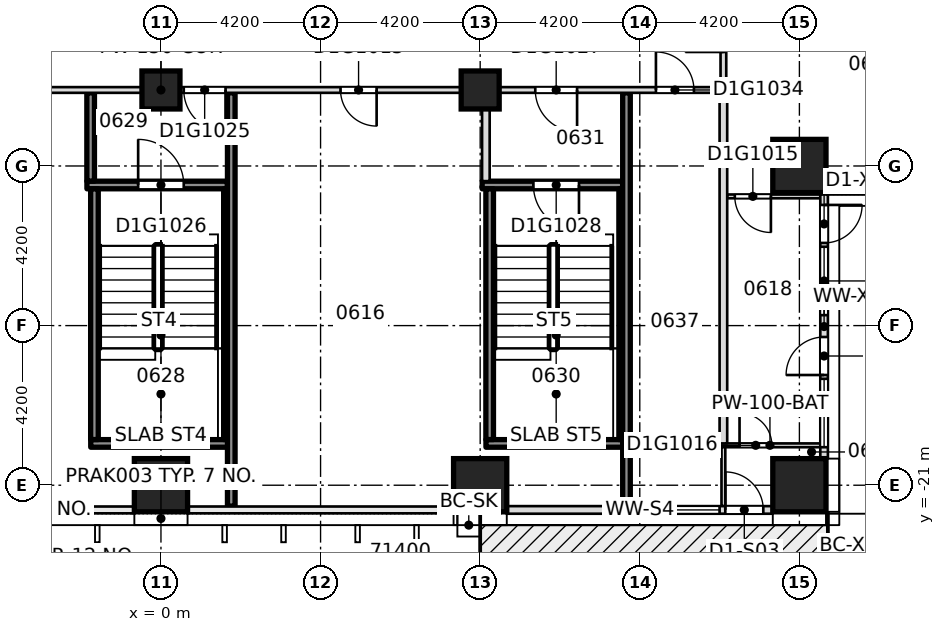
"""IFC4 building model, lengths in metres.
Left out: names, types, materials, properties, quantities, classifications, styles, units other than length and angle.
Written with IfcOpenShell. Run it as: python <this file> out.ifc"""

import sys

from ifc_helpers import new_model, si_unit, direction, frame, frame_2d, origin, origin_2d, place, context, subcontext, project, spatial, rectangle, extrude, element, fill, save


model = new_model("IFC4")
c1 = context("Model", 3, precision=1e-05, world=origin(), true_north=direction((0.0, 1.0)))
c2 = subcontext(c1, "Body", "Model", "MODEL_VIEW")
j1 = project(units=[si_unit("LENGTHUNIT", "METRE"), si_unit("PLANEANGLEUNIT", "RADIAN")], contexts=[c1])
p1 = place(None, origin())
s1 = spatial("IfcSite", under=j1, at=p1, CompositionType="ELEMENT")
p2 = place(p1, origin())
s2 = spatial("IfcBuilding", under=s1, at=p2, CompositionType="ELEMENT")
p3 = place(p2, frame((0.0, 0.0, 34.5)))
s3 = spatial("IfcBuildingStorey", under=s2, at=p3, CompositionType="ELEMENT", Elevation=34.5)
for number, where, z_axis, x_axis in (
    (1, (0.0, -21.0, -0.32), (0.0, 0.0, 1.0), (1.0, 0.0, 0.0)),
    (2, (8.4, -21.0, -0.32), (0.0, 0.0, 1.0), (1.0, 0.0, 0.0)),
    (3, (16.8, -21.0, -0.32), (0.0, 0.0, 1.0), (1.0, 0.0, 0.0)),
    (4, (16.8, -12.6, -0.32), (0.0, 0.0, 1.0), (1.0, 0.0, 0.0)),
):
    element("IfcColumn", number, at=place(p3, frame(where, z_axis=z_axis, x_axis=x_axis)), inside=s3, PredefinedType="COLUMN", context=c2, shape_type="SweptSolid", body=[
        extrude(rectangle(XDim=1.4, YDim=1.4, at=origin_2d()), origin(), (0.0, 0.0, 1.0), 3.45),
    ])
for number, where, z_axis, x_axis in (
    (5, (0.0, -10.6, -0.32), (0.0, 0.0, 1.0), (1.0, 0.0, 0.0)),
    (6, (8.4, -10.6, -0.32), (0.0, 0.0, 1.0), (1.0, 0.0, 0.0)),
):
    element("IfcColumn", number, at=place(p3, frame(where, z_axis=z_axis, x_axis=x_axis)), inside=s3, PredefinedType="COLUMN", context=c2, shape_type="SweptSolid", body=[
        extrude(rectangle(XDim=1.0, YDim=1.0, at=origin_2d()), origin(), (0.0, 0.0, 1.0), 3.45),
    ])
p4 = place(p3, frame((14.7, -19.95, 0.0), z_axis=(0.0, 0.0, 1.0), x_axis=(1.0, 0.0, 0.0)))
e7 = element("IfcWall", 7, at=p4, inside=s3, PredefinedType="PARTITIONING", context=c2, shape_type="SweptSolid", body=[
    extrude(rectangle(XDim=2.65, YDim=0.1, at=frame_2d((1.325, 0.0))), origin(), (0.0, 0.0, 1.0), 3.13),
])
p5 = place(p4, frame((0.525, 0.0, 0.0)))
e8 = element("IfcOpeningElement", 8, at=p5, cuts=e7, PredefinedType="OPENING", context=c2, shape_type="SweptSolid", body=[
    extrude(rectangle(XDim=0.85, YDim=2.1, at=frame_2d((0.425, 1.05))), frame((0.0, 0.06, 0.0), z_axis=(0.0, -1.0, 0.0), x_axis=(1.0, 0.0, 0.0)), (0.0, 0.0, 1.0), 0.12),
])
p6 = place(p3, frame((-1.848, -19.9, 0.0), z_axis=(0.0, 0.0, 1.0), x_axis=(1.0, 0.0, 0.0)))
e9 = element("IfcWall", 9, at=p6, inside=s3, PredefinedType="SOLIDWALL", context=c2, shape_type="SweptSolid", body=[
    extrude(rectangle(XDim=3.696, YDim=0.2, at=frame_2d((1.848, 0.0))), origin(), (0.0, 0.0, 1.0), 3.13),
])
p7 = place(p3, frame((8.552, -19.9, 0.0), z_axis=(0.0, 0.0, 1.0), x_axis=(1.0, 0.0, 0.0)))
e10 = element("IfcWall", 10, at=p7, inside=s3, PredefinedType="SOLIDWALL", context=c2, shape_type="SweptSolid", body=[
    extrude(rectangle(XDim=3.696, YDim=0.2, at=frame_2d((1.848, 0.0))), origin(), (0.0, 0.0, 1.0), 3.13),
])
p8 = place(p3, frame((14.9, -13.4, 0.0), z_axis=(0.0, 0.0, 1.0), x_axis=(1.0, 0.0, 0.0)))
e11 = element("IfcWall", 11, at=p8, inside=s3, PredefinedType="PARTITIONING", context=c2, shape_type="SweptSolid", body=[
    extrude(rectangle(XDim=2.45, YDim=0.1, at=frame_2d((1.225, 0.0))), origin(), (0.0, 0.0, 1.0), 3.13),
])
p9 = place(p8, frame((0.2, 0.0, 0.0)))
e12 = element("IfcOpeningElement", 12, at=p9, cuts=e11, PredefinedType="OPENING", context=c2, shape_type="SweptSolid", body=[
    extrude(rectangle(XDim=0.95, YDim=2.1, at=frame_2d((0.475, 1.05))), frame((0.0, 0.06, 0.0), z_axis=(0.0, -1.0, 0.0), x_axis=(1.0, 0.0, 0.0)), (0.0, 0.0, 1.0), 0.12),
])
p10 = place(p3, frame((-1.948, -13.1, 0.0), z_axis=(0.0, 0.0, 1.0), x_axis=(1.0, 0.0, 0.0)))
e13 = element("IfcWall", 13, at=p10, inside=s3, PredefinedType="SOLIDWALL", context=c2, shape_type="SweptSolid", body=[
    extrude(rectangle(XDim=3.696, YDim=0.2, at=frame_2d((1.848, 0.0))), origin(), (0.0, 0.0, 1.0), 3.13),
])
p11 = place(p10, frame((1.348, 0.0, 0.0)))
e14 = element("IfcOpeningElement", 14, at=p11, cuts=e13, PredefinedType="OPENING", context=c2, shape_type="SweptSolid", body=[
    extrude(rectangle(XDim=1.2, YDim=2.1, at=frame_2d((0.6, 1.05))), frame((0.0, 0.11, 0.0), z_axis=(0.0, -1.0, 0.0), x_axis=(1.0, 0.0, 0.0)), (0.0, 0.0, 1.0), 0.22),
])
p12 = place(p3, frame((8.452, -13.1, 0.0), z_axis=(0.0, 0.0, 1.0), x_axis=(1.0, 0.0, 0.0)))
e15 = element("IfcWall", 15, at=p12, inside=s3, PredefinedType="SOLIDWALL", context=c2, shape_type="SweptSolid", body=[
    extrude(rectangle(XDim=3.696, YDim=0.2, at=frame_2d((1.848, 0.0))), origin(), (0.0, 0.0, 1.0), 3.13),
])
p13 = place(p12, frame((1.348, 0.0, 0.0)))
e16 = element("IfcOpeningElement", 16, at=p13, cuts=e15, PredefinedType="OPENING", context=c2, shape_type="SweptSolid", body=[
    extrude(rectangle(XDim=1.2, YDim=2.1, at=frame_2d((0.6, 1.05))), frame((0.0, 0.11, 0.0), z_axis=(0.0, -1.0, 0.0), x_axis=(1.0, 0.0, 0.0)), (0.0, 0.0, 1.0), 0.22),
])
p14 = place(p3, frame((-14.9, -10.6, 0.0), z_axis=(0.0, 0.0, 1.0), x_axis=(1.0, 0.0, 0.0)))
e17 = element("IfcWall", 17, at=p14, inside=s3, PredefinedType="PARTITIONING", context=c2, shape_type="SweptSolid", body=[
    extrude(rectangle(XDim=29.8, YDim=0.15, at=frame_2d((14.9, 0.0))), origin(), (0.0, 0.0, 1.0), 3.13),
])
p15 = place(p14, frame((9.225, 0.0, 0.0)))
e18 = element("IfcOpeningElement", 18, at=p15, cuts=e17, PredefinedType="OPENING", context=c2, shape_type="SweptSolid", body=[
    extrude(rectangle(XDim=0.95, YDim=2.1, at=frame_2d((0.475, 1.05))), frame((0.0, 0.085, 0.0), z_axis=(0.0, -1.0, 0.0), x_axis=(1.0, 0.0, 0.0)), (0.0, 0.0, 1.0), 0.17),
])
p16 = place(p14, frame((19.625, 0.0, 0.0)))
e19 = element("IfcOpeningElement", 19, at=p16, cuts=e17, PredefinedType="OPENING", context=c2, shape_type="SweptSolid", body=[
    extrude(rectangle(XDim=0.95, YDim=2.1, at=frame_2d((0.475, 1.05))), frame((0.0, 0.085, 0.0), z_axis=(0.0, -1.0, 0.0), x_axis=(1.0, 0.0, 0.0)), (0.0, 0.0, 1.0), 0.17),
])
p17 = place(p14, frame((3.95, 0.0, 0.0)))
e20 = element("IfcOpeningElement", 20, at=p17, cuts=e17, PredefinedType="OPENING", context=c2, shape_type="SweptSolid", body=[
    extrude(rectangle(XDim=1.1, YDim=2.1, at=frame_2d((0.55, 1.05))), frame((0.0, 0.085, 0.0), z_axis=(0.0, -1.0, 0.0), x_axis=(1.0, 0.0, 0.0)), (0.0, 0.0, 1.0), 0.17),
])
p18 = place(p14, frame((15.5, 0.0, 0.0)))
e21 = element("IfcOpeningElement", 21, at=p18, cuts=e17, PredefinedType="OPENING", context=c2, shape_type="SweptSolid", body=[
    extrude(rectangle(XDim=1.1, YDim=2.1, at=frame_2d((0.55, 1.05))), frame((0.0, 0.085, 0.0), z_axis=(0.0, -1.0, 0.0), x_axis=(1.0, 0.0, 0.0)), (0.0, 0.0, 1.0), 0.17),
])
p19 = place(p14, frame((24.75, 0.0, 0.0)))
e22 = element("IfcOpeningElement", 22, at=p19, cuts=e17, PredefinedType="OPENING", context=c2, shape_type="SweptSolid", body=[
    extrude(rectangle(XDim=1.1, YDim=2.1, at=frame_2d((0.55, 1.05))), frame((0.0, 0.085, 0.0), z_axis=(0.0, -1.0, 0.0), x_axis=(1.0, 0.0, 0.0)), (0.0, 0.0, 1.0), 0.17),
])
p20 = place(p14, frame((0.875, 0.0, 0.0)))
e23 = element("IfcOpeningElement", 23, at=p20, cuts=e17, PredefinedType="OPENING", context=c2, shape_type="SweptSolid", body=[
    extrude(rectangle(XDim=1.0, YDim=2.1, at=frame_2d((0.5, 1.05))), frame((0.0, 0.085, 0.0), z_axis=(0.0, -1.0, 0.0), x_axis=(1.0, 0.0, 0.0)), (0.0, 0.0, 1.0), 0.17),
])
p21 = place(p14, frame((27.925, 0.0, 0.0)))
e24 = element("IfcOpeningElement", 24, at=p21, cuts=e17, PredefinedType="OPENING", context=c2, shape_type="SweptSolid", body=[
    extrude(rectangle(XDim=1.0, YDim=2.1, at=frame_2d((0.5, 1.05))), frame((0.0, 0.085, 0.0), z_axis=(0.0, -1.0, 0.0), x_axis=(1.0, 0.0, 0.0)), (0.0, 0.0, 1.0), 0.17),
])
p22 = place(p3, frame((-1.85, -12.998, 0.0), z_axis=(0.0, 0.0, 1.0), x_axis=(0.0, 1.0, 0.0)))
e25 = element("IfcWall", 25, at=p22, inside=s3, PredefinedType="SOLIDWALL", context=c2, shape_type="SweptSolid", body=[
    extrude(rectangle(XDim=2.323, YDim=0.2, at=frame_2d((1.162, 0.0))), origin(), (0.0, 0.0, 1.0), 3.13),
])
for number, where, z_axis, x_axis in (
    (26, (-1.75, -19.798, 0.0), (0.0, 0.0, 1.0), (0.0, 1.0, 0.0)),
    (27, (1.75, -19.798, 0.0), (0.0, 0.0, 1.0), (0.0, 1.0, 0.0)),
):
    element("IfcWall", number, at=place(p3, frame(where, z_axis=z_axis, x_axis=x_axis)), inside=s3, PredefinedType="SOLIDWALL", context=c2, shape_type="SweptSolid", body=[
        extrude(rectangle(XDim=6.596, YDim=0.2, at=frame_2d((3.298, 0.0))), origin(), (0.0, 0.0, 1.0), 3.13),
    ])
p23 = place(p3, frame((8.55, -12.998, 0.0), z_axis=(0.0, 0.0, 1.0), x_axis=(0.0, 1.0, 0.0)))
e28 = element("IfcWall", 28, at=p23, inside=s3, PredefinedType="PARTITIONING", context=c2, shape_type="SweptSolid", body=[
    extrude(rectangle(XDim=2.323, YDim=0.2, at=frame_2d((1.162, 0.0))), origin(), (0.0, 0.0, 1.0), 3.13),
])
for number, where, z_axis, x_axis in (
    (29, (8.65, -19.798, 0.0), (0.0, 0.0, 1.0), (0.0, 1.0, 0.0)),
    (30, (12.15, -19.798, 0.0), (0.0, 0.0, 1.0), (0.0, 1.0, 0.0)),
):
    element("IfcWall", number, at=place(p3, frame(where, z_axis=z_axis, x_axis=x_axis)), inside=s3, PredefinedType="SOLIDWALL", context=c2, shape_type="SweptSolid", body=[
        extrude(rectangle(XDim=6.596, YDim=0.2, at=frame_2d((3.298, 0.0))), origin(), (0.0, 0.0, 1.0), 3.13),
    ])
p24 = place(p3, frame((14.8, -21.55, 0.0), z_axis=(0.0, 0.0, 1.0), x_axis=(0.0, 1.0, 0.0)))
e31 = element("IfcWall", 31, at=p24, inside=s3, PredefinedType="PARTITIONING", context=c2, shape_type="SweptSolid", body=[
    extrude(rectangle(XDim=1.55, YDim=0.1, at=frame_2d((0.775, 0.0))), origin(), (0.0, 0.0, 1.0), 3.13),
])
p25 = place(p3, frame((14.8, -19.9, 0.0), z_axis=(0.0, 0.0, 1.0), x_axis=(0.0, 1.0, 0.0)))
e32 = element("IfcWall", 32, at=p25, inside=s3, PredefinedType="PARTITIONING", context=c2, shape_type="SweptSolid", body=[
    extrude(rectangle(XDim=9.225, YDim=0.2, at=frame_2d((4.612, 0.0))), origin(), (0.0, 0.0, 1.0), 3.13),
])
p26 = place(p3, frame((14.8, -10.525, 0.0), z_axis=(0.0, 0.0, 1.0), x_axis=(0.0, 1.0, 0.0)))
e33 = element("IfcWall", 33, at=p26, inside=s3, PredefinedType="PARTITIONING", context=c2, shape_type="SweptSolid", body=[
    extrude(rectangle(XDim=23.825, YDim=0.15, at=frame_2d((11.913, 0.0))), origin(), (0.0, 0.0, 1.0), 3.13),
])
p27 = place(p26, frame((0.925, 0.0, 0.0)))
e34 = element("IfcOpeningElement", 34, at=p27, cuts=e33, PredefinedType="OPENING", context=c2, shape_type="SweptSolid", body=[
    extrude(rectangle(XDim=1.0, YDim=2.1, at=frame_2d((0.5, 1.05))), frame((0.0, 0.085, 0.0), z_axis=(0.0, -1.0, 0.0), x_axis=(1.0, 0.0, 0.0)), (0.0, 0.0, 1.0), 0.17),
])
p28 = place(p26, frame((15.9, 0.0, 0.0)))
e35 = element("IfcOpeningElement", 35, at=p28, cuts=e33, PredefinedType="OPENING", context=c2, shape_type="SweptSolid", body=[
    extrude(rectangle(XDim=1.0, YDim=2.1, at=frame_2d((0.5, 1.05))), frame((0.0, 0.085, 0.0), z_axis=(0.0, -1.0, 0.0), x_axis=(1.0, 0.0, 0.0)), (0.0, 0.0, 1.0), 0.17),
])
p29 = place(p26, frame((20.9, 0.0, 0.0)))
e36 = element("IfcOpeningElement", 36, at=p29, cuts=e33, PredefinedType="OPENING", context=c2, shape_type="SweptSolid", body=[
    extrude(rectangle(XDim=0.95, YDim=2.1, at=frame_2d((0.475, 1.05))), frame((0.0, 0.085, 0.0), z_axis=(0.0, -1.0, 0.0), x_axis=(1.0, 0.0, 0.0)), (0.0, 0.0, 1.0), 0.17),
])
p30 = place(p26, frame((9.975, 0.0, 0.0)))
e37 = element("IfcOpeningElement", 37, at=p30, cuts=e33, PredefinedType="OPENING", context=c2, shape_type="SweptSolid", body=[
    extrude(rectangle(XDim=1.1, YDim=2.1, at=frame_2d((0.55, 1.05))), frame((0.0, 0.085, 0.0), z_axis=(0.0, -1.0, 0.0), x_axis=(1.0, 0.0, 0.0)), (0.0, 0.0, 1.0), 0.17),
])
p31 = place(p26, frame((4.725, 0.0, 0.0)))
e38 = element("IfcOpeningElement", 38, at=p31, cuts=e33, PredefinedType="OPENING", context=c2, shape_type="SweptSolid", body=[
    extrude(rectangle(XDim=1.0, YDim=2.1, at=frame_2d((0.5, 1.05))), frame((0.0, 0.085, 0.0), z_axis=(0.0, -1.0, 0.0), x_axis=(1.0, 0.0, 0.0)), (0.0, 0.0, 1.0), 0.17),
])
p32 = place(p3, frame((9.1, -21.65, 0.0), z_axis=(0.0, 0.0, 1.0), x_axis=(1.0, 0.0, 0.0)))
e39 = element("IfcWall", 39, at=p32, inside=s3, PredefinedType="STANDARD", context=c2, shape_type="SweptSolid", body=[
    extrude(rectangle(XDim=7.0, YDim=0.2, at=frame_2d((3.5, 0.0))), origin(), (0.0, 0.0, 1.0), 3.13),
])
p33 = place(p32, frame((3.8, 0.0, 0.2)))
e40 = element("IfcOpeningElement", 40, at=p33, cuts=e39, PredefinedType="OPENING", context=c2, shape_type="SweptSolid", body=[
    extrude(rectangle(XDim=1.8, YDim=2.65, at=frame_2d((0.9, 1.325))), frame((0.0, 0.11, 0.0), z_axis=(0.0, -1.0, 0.0), x_axis=(1.0, 0.0, 0.0)), (0.0, 0.0, 1.0), 0.22),
])
p34 = place(p32, frame((5.75, 0.0, 0.0)))
e41 = element("IfcOpeningElement", 41, at=p34, cuts=e39, PredefinedType="OPENING", context=c2, shape_type="SweptSolid", body=[
    extrude(rectangle(XDim=1.0, YDim=2.4, at=frame_2d((0.5, 1.2))), frame((0.0, 0.11, 0.0), z_axis=(0.0, -1.0, 0.0), x_axis=(1.0, 0.0, 0.0)), (0.0, 0.0, 1.0), 0.22),
])
p35 = place(p3, frame((17.45, -20.3, 0.0), z_axis=(0.0, 0.0, 1.0), x_axis=(0.0, 1.0, 0.0)))
e42 = element("IfcWall", 42, at=p35, inside=s3, PredefinedType="STANDARD", context=c2, shape_type="SweptSolid", body=[
    extrude(rectangle(XDim=6.95, YDim=0.2, at=frame_2d((3.475, 0.0))), origin(), (0.0, 0.0, 1.0), 3.13),
])
p36 = place(p35, frame((0.3, 0.0, 0.2)))
e43 = element("IfcOpeningElement", 43, at=p36, cuts=e42, PredefinedType="OPENING", context=c2, shape_type="SweptSolid", body=[
    extrude(rectangle(XDim=1.8, YDim=2.65, at=frame_2d((0.9, 1.325))), frame((0.0, 0.11, 0.0), z_axis=(0.0, -1.0, 0.0), x_axis=(1.0, 0.0, 0.0)), (0.0, 0.0, 1.0), 0.22),
])
p37 = place(p35, frame((2.2, 0.0, 0.0)))
e44 = element("IfcOpeningElement", 44, at=p37, cuts=e42, PredefinedType="OPENING", context=c2, shape_type="SweptSolid", body=[
    extrude(rectangle(XDim=1.0, YDim=2.4, at=frame_2d((0.5, 1.2))), frame((0.0, 0.11, 0.0), z_axis=(0.0, -1.0, 0.0), x_axis=(1.0, 0.0, 0.0)), (0.0, 0.0, 1.0), 0.22),
])
p38 = place(p35, frame((3.775, 0.0, 0.2)))
e45 = element("IfcOpeningElement", 45, at=p38, cuts=e42, PredefinedType="OPENING", context=c2, shape_type="SweptSolid", body=[
    extrude(rectangle(XDim=1.8, YDim=2.65, at=frame_2d((0.9, 1.325))), frame((0.0, 0.11, 0.0), z_axis=(0.0, -1.0, 0.0), x_axis=(1.0, 0.0, 0.0)), (0.0, 0.0, 1.0), 0.22),
])
p39 = place(p35, frame((5.675, 0.0, 0.0)))
e46 = element("IfcOpeningElement", 46, at=p39, cuts=e42, PredefinedType="OPENING", context=c2, shape_type="SweptSolid", body=[
    extrude(rectangle(XDim=1.0, YDim=2.4, at=frame_2d((0.5, 1.2))), frame((0.0, 0.11, 0.0), z_axis=(0.0, -1.0, 0.0), x_axis=(1.0, 0.0, 0.0)), (0.0, 0.0, 1.0), 0.22),
])
p40 = place(p3, frame((17.55, -13.25, 0.0), z_axis=(0.0, 0.0, 1.0), x_axis=(1.0, 0.0, 0.0)))
e47 = element("IfcWall", 47, at=p40, inside=s3, PredefinedType="STANDARD", context=c2, shape_type="SweptSolid", body=[
    extrude(rectangle(XDim=6.95, YDim=0.2, at=frame_2d((3.475, 0.0))), origin(), (0.0, 0.0, 1.0), 3.13),
])
p41 = place(p40, frame((2.975, 0.0, 0.0)))
e48 = element("IfcOpeningElement", 48, at=p41, cuts=e47, PredefinedType="OPENING", context=c2, shape_type="SweptSolid", body=[
    extrude(rectangle(XDim=1.0, YDim=2.4, at=frame_2d((0.5, 1.2))), frame((0.0, 0.11, 0.0), z_axis=(0.0, -1.0, 0.0), x_axis=(1.0, 0.0, 0.0)), (0.0, 0.0, 1.0), 0.22),
])
for number, where, z_axis, x_axis in (
    (49, (1.85, -21.55, 0.0), (0.0, 0.0, 1.0), (0.0, 1.0, 0.0)),
    (50, (12.25, -21.55, 0.0), (0.0, 0.0, 1.0), (0.0, 1.0, 0.0)),
):
    element("IfcWall", number, at=place(p3, frame(where, z_axis=z_axis, x_axis=x_axis)), inside=s3, PredefinedType="SOLIDWALL", context=c2, shape_type="SweptSolid", body=[
        extrude(rectangle(XDim=10.875, YDim=0.2, at=frame_2d((5.438, 0.0))), origin(), (0.0, 0.0, 1.0), 3.13),
    ])
p42 = place(p16, origin())
e51 = element("IfcDoor", 51, at=p42, inside=s3, OperationType="SINGLE_SWING_RIGHT", PredefinedType="DOOR", context=c2, shape_type="SweptSolid", body=[
    extrude(rectangle(XDim=0.95, YDim=2.1, at=frame_2d((0.475, 1.05))), frame((0.0, 0.025, 0.0), z_axis=(0.0, -1.0, 0.0), x_axis=(1.0, 0.0, 0.0)), (0.0, 0.0, 1.0), 0.05),
])
fill(e19, e51)
p43 = place(p9, origin())
e52 = element("IfcDoor", 52, at=p43, inside=s3, OperationType="SINGLE_SWING_RIGHT", PredefinedType="DOOR", context=c2, shape_type="SweptSolid", body=[
    extrude(rectangle(XDim=0.95, YDim=2.1, at=frame_2d((0.475, 1.05))), frame((0.0, 0.025, 0.0), z_axis=(0.0, -1.0, 0.0), x_axis=(1.0, 0.0, 0.0)), (0.0, 0.0, 1.0), 0.05),
])
fill(e12, e52)
p44 = place(p5, origin())
e53 = element("IfcDoor", 53, at=p44, inside=s3, OperationType="SINGLE_SWING_LEFT", PredefinedType="DOOR", context=c2, shape_type="SweptSolid", body=[
    extrude(rectangle(XDim=0.85, YDim=2.1, at=frame_2d((0.425, 1.05))), frame((0.0, 0.025, 0.0), z_axis=(0.0, -1.0, 0.0), x_axis=(1.0, 0.0, 0.0)), (0.0, 0.0, 1.0), 0.05),
])
fill(e8, e53)
p45 = place(p18, origin())
e54 = element("IfcDoor", 54, at=p45, inside=s3, OperationType="SINGLE_SWING_LEFT", PredefinedType="DOOR", context=c2, shape_type="SweptSolid", body=[
    extrude(rectangle(XDim=1.1, YDim=2.1, at=frame_2d((0.55, 1.05))), frame((0.0, 0.025, 0.0), z_axis=(0.0, -1.0, 0.0), x_axis=(1.0, 0.0, 0.0)), (0.0, 0.0, 1.0), 0.05),
])
fill(e21, e54)
p46 = place(p11, origin())
e55 = element("IfcDoor", 55, at=p46, inside=s3, OperationType="SINGLE_SWING_RIGHT", PredefinedType="DOOR", context=c2, shape_type="SweptSolid", body=[
    extrude(rectangle(XDim=1.2, YDim=2.1, at=frame_2d((0.6, 1.05))), frame((0.0, 0.025, 0.0), z_axis=(0.0, -1.0, 0.0), x_axis=(1.0, 0.0, 0.0)), (0.0, 0.0, 1.0), 0.05),
])
fill(e14, e55)
p47 = place(p19, origin())
e56 = element("IfcDoor", 56, at=p47, inside=s3, OperationType="SINGLE_SWING_RIGHT", PredefinedType="DOOR", context=c2, shape_type="SweptSolid", body=[
    extrude(rectangle(XDim=1.1, YDim=2.1, at=frame_2d((0.55, 1.05))), frame((0.0, 0.025, 0.0), z_axis=(0.0, -1.0, 0.0), x_axis=(1.0, 0.0, 0.0)), (0.0, 0.0, 1.0), 0.05),
])
fill(e22, e56)
p48 = place(p13, origin())
e57 = element("IfcDoor", 57, at=p48, inside=s3, OperationType="SINGLE_SWING_RIGHT", PredefinedType="DOOR", context=c2, shape_type="SweptSolid", body=[
    extrude(rectangle(XDim=1.2, YDim=2.1, at=frame_2d((0.6, 1.05))), frame((0.0, 0.025, 0.0), z_axis=(0.0, -1.0, 0.0), x_axis=(1.0, 0.0, 0.0)), (0.0, 0.0, 1.0), 0.05),
])
fill(e16, e57)
p49 = place(p21, origin())
e58 = element("IfcDoor", 58, at=p49, inside=s3, OperationType="SINGLE_SWING_LEFT", PredefinedType="DOOR", context=c2, shape_type="SweptSolid", body=[
    extrude(rectangle(XDim=1.0, YDim=2.1, at=frame_2d((0.5, 1.05))), frame((0.0, 0.025, 0.0), z_axis=(0.0, -1.0, 0.0), x_axis=(1.0, 0.0, 0.0)), (0.0, 0.0, 1.0), 0.05),
])
fill(e24, e58)
p50 = place(p33, origin())
e59 = element("IfcWindow", 59, at=p50, inside=s3, PartitioningType="SINGLE_PANEL", PredefinedType="WINDOW", context=c2, shape_type="SweptSolid", body=[
    extrude(rectangle(XDim=1.8, YDim=2.65, at=frame_2d((0.9, 1.325))), frame((0.0, 0.03, 0.0), z_axis=(0.0, -1.0, 0.0), x_axis=(1.0, 0.0, 0.0)), (0.0, 0.0, 1.0), 0.06),
])
fill(e40, e59)
p51 = place(p34, origin())
e60 = element("IfcDoor", 60, at=p51, inside=s3, OperationType="SINGLE_SWING_LEFT", PredefinedType="DOOR", context=c2, shape_type="SweptSolid", body=[
    extrude(rectangle(XDim=1.0, YDim=2.4, at=frame_2d((0.5, 1.2))), frame((0.0, 0.025, 0.0), z_axis=(0.0, -1.0, 0.0), x_axis=(1.0, 0.0, 0.0)), (0.0, 0.0, 1.0), 0.05),
])
fill(e41, e60)
p52 = place(p36, origin())
e61 = element("IfcWindow", 61, at=p52, inside=s3, PartitioningType="SINGLE_PANEL", PredefinedType="WINDOW", context=c2, shape_type="SweptSolid", body=[
    extrude(rectangle(XDim=1.8, YDim=2.65, at=frame_2d((0.9, 1.325))), frame((0.0, 0.03, 0.0), z_axis=(0.0, -1.0, 0.0), x_axis=(1.0, 0.0, 0.0)), (0.0, 0.0, 1.0), 0.06),
])
fill(e43, e61)
p53 = place(p37, origin())
e62 = element("IfcDoor", 62, at=p53, inside=s3, OperationType="SINGLE_SWING_LEFT", PredefinedType="DOOR", context=c2, shape_type="SweptSolid", body=[
    extrude(rectangle(XDim=1.0, YDim=2.4, at=frame_2d((0.5, 1.2))), frame((0.0, 0.025, 0.0), z_axis=(0.0, -1.0, 0.0), x_axis=(1.0, 0.0, 0.0)), (0.0, 0.0, 1.0), 0.05),
])
fill(e44, e62)
p54 = place(p38, origin())
e63 = element("IfcWindow", 63, at=p54, inside=s3, PartitioningType="SINGLE_PANEL", PredefinedType="WINDOW", context=c2, shape_type="SweptSolid", body=[
    extrude(rectangle(XDim=1.8, YDim=2.65, at=frame_2d((0.9, 1.325))), frame((0.0, 0.03, 0.0), z_axis=(0.0, -1.0, 0.0), x_axis=(1.0, 0.0, 0.0)), (0.0, 0.0, 1.0), 0.06),
])
fill(e45, e63)
p55 = place(p39, origin())
e64 = element("IfcDoor", 64, at=p55, inside=s3, OperationType="SINGLE_SWING_LEFT", PredefinedType="DOOR", context=c2, shape_type="SweptSolid", body=[
    extrude(rectangle(XDim=1.0, YDim=2.4, at=frame_2d((0.5, 1.2))), frame((0.0, 0.025, 0.0), z_axis=(0.0, -1.0, 0.0), x_axis=(1.0, 0.0, 0.0)), (0.0, 0.0, 1.0), 0.05),
])
fill(e46, e64)
save(model, sys.argv[1])
